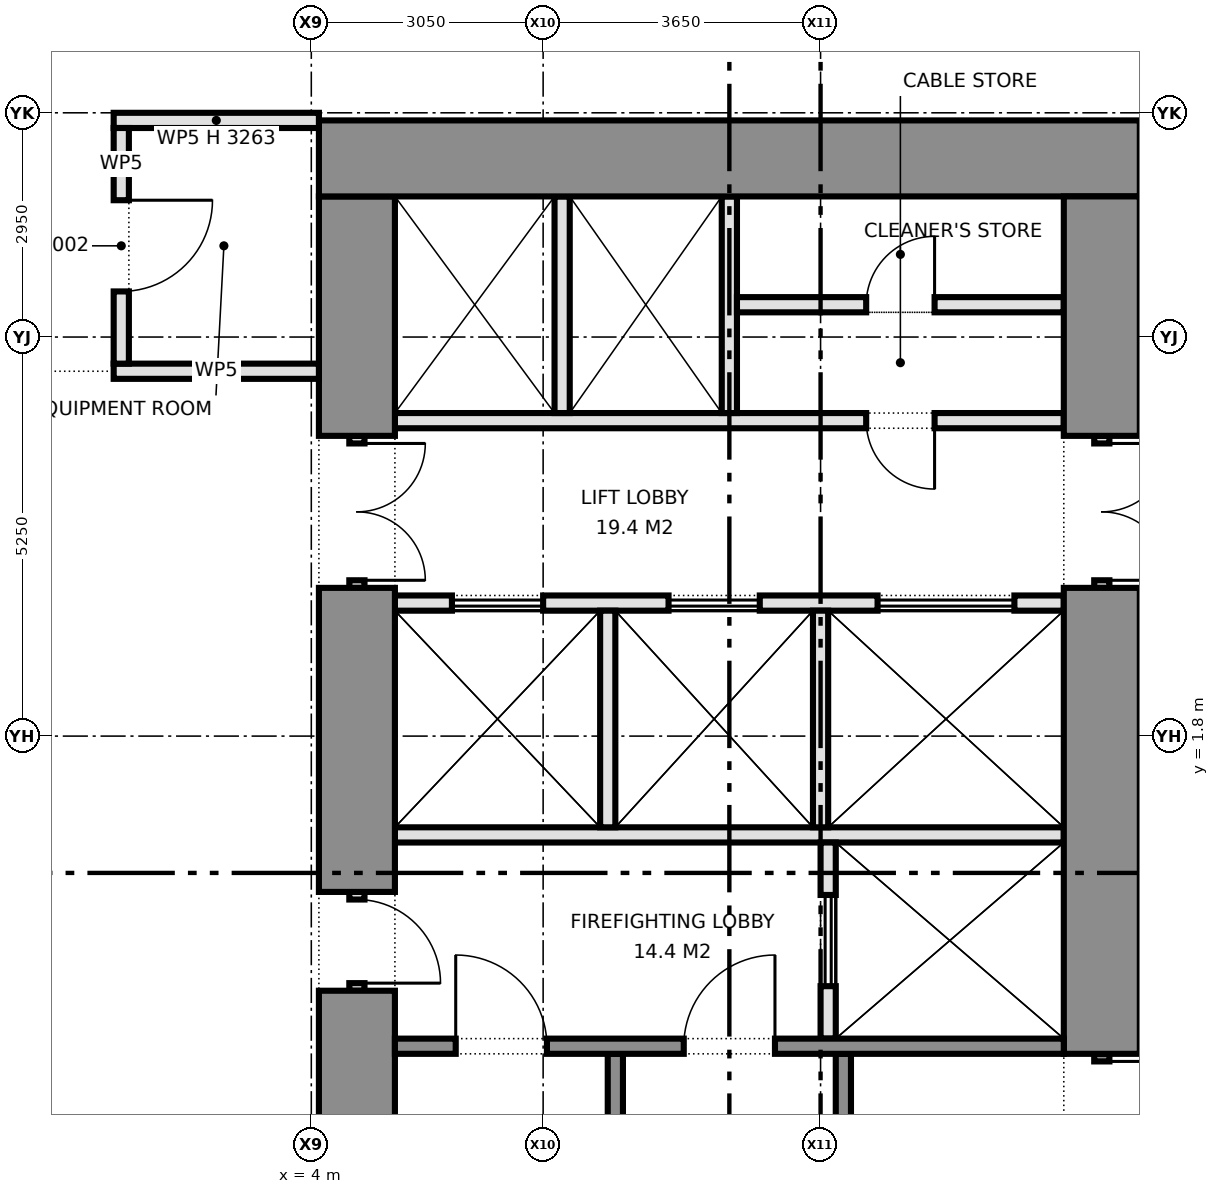
"""IFC4 building model, lengths in metres.
Left out: names, types, materials, properties, quantities, classifications, styles, units other than length and angle.
Written with IfcOpenShell. Run it as: python <this file> out.ifc"""

import sys

from ifc_helpers import new_model, si_unit, direction, frame, frame_2d, origin, place, context, subcontext, project, spatial, rectangle, extrude, element, fill, save


model = new_model("IFC4")
c1 = context("Model", 3, precision=1e-05, world=origin(), true_north=direction((0.0, 1.0)))
c2 = subcontext(c1, "Body", "Model", "MODEL_VIEW")
j1 = project(units=[si_unit("LENGTHUNIT", "METRE"), si_unit("PLANEANGLEUNIT", "RADIAN")], contexts=[c1])
p1 = place(None, origin())
s1 = spatial("IfcSite", under=j1, at=p1, CompositionType="ELEMENT")
p2 = place(p1, origin())
s2 = spatial("IfcBuilding", under=s1, at=p2, CompositionType="ELEMENT")
p3 = place(p2, frame((0.0, 0.0, 99.6)))
s3 = spatial("IfcBuildingStorey", under=s2, at=p3, CompositionType="ELEMENT", Elevation=99.6)
p4 = place(p3, frame((14.9, 9.4, 0.0), z_axis=(0.0, 0.0, 1.0), x_axis=(-1.0, 0.0, 0.0)))
e1 = element("IfcWall", 1, at=p4, inside=s3, PredefinedType="SHEAR", context=c2, shape_type="SweptSolid", body=[
    extrude(rectangle(XDim=10.8, YDim=1.0, at=frame_2d((5.4, 0.0))), origin(), (0.0, 0.0, 1.0), 4.2),
])
p5 = place(p3, frame((14.4, 8.9, 0.0), z_axis=(0.0, 0.0, 1.0), x_axis=(0.0, -1.0, 0.0)))
e2 = element("IfcWall", 2, at=p5, inside=s3, PredefinedType="SHEAR", context=c2, shape_type="SweptSolid", body=[
    extrude(rectangle(XDim=3.15, YDim=1.0, at=frame_2d((1.575, 0.0))), origin(), (0.0, 0.0, 1.0), 4.2),
])
p6 = place(p3, frame((14.4, 5.75, 0.0), z_axis=(0.0, 0.0, 1.0), x_axis=(0.0, -1.0, 0.0)))
e3 = element("IfcWall", 3, at=p6, inside=s3, PredefinedType="PARTITIONING", context=c2, shape_type="SweptSolid", body=[
    extrude(rectangle(XDim=2.0, YDim=0.2, at=frame_2d((1.0, 0.0))), origin(), (0.0, 0.0, 1.0), 2.4),
])
p7 = place(p6, frame((0.1, 0.0, 0.0)))
e4 = element("IfcOpeningElement", 4, at=p7, cuts=e3, PredefinedType="OPENING", context=c2, shape_type="SweptSolid", body=[
    extrude(rectangle(XDim=1.8, YDim=2.1, at=frame_2d((0.9, 1.05))), frame((0.0, 0.11, 0.0), z_axis=(0.0, -1.0, 0.0), x_axis=(1.0, 0.0, 0.0)), (0.0, 0.0, 1.0), 0.22),
])
p8 = place(p3, frame((14.4, 3.75, 0.0), z_axis=(0.0, 0.0, 1.0), x_axis=(0.0, -1.0, 0.0)))
e5 = element("IfcWall", 5, at=p8, inside=s3, PredefinedType="SHEAR", context=c2, shape_type="SweptSolid", body=[
    extrude(rectangle(XDim=6.13, YDim=1.0, at=frame_2d((3.065, 0.0))), origin(), (0.0, 0.0, 1.0), 4.2),
])
p9 = place(p3, frame((14.4, -2.38, 0.0), z_axis=(0.0, 0.0, 1.0), x_axis=(0.0, -1.0, 0.0)))
e6 = element("IfcWall", 6, at=p9, inside=s3, PredefinedType="SHEAR", context=c2, shape_type="SweptSolid", body=[
    extrude(rectangle(XDim=1.3, YDim=0.2, at=frame_2d((0.65, 0.0))), origin(), (0.0, 0.0, 1.0), 2.4),
])
p10 = place(p9, frame((0.1, 0.0, 0.0)))
e7 = element("IfcOpeningElement", 7, at=p10, cuts=e6, PredefinedType="OPENING", context=c2, shape_type="SweptSolid", body=[
    extrude(rectangle(XDim=1.1, YDim=2.1, at=frame_2d((0.55, 1.05))), frame((0.0, 0.11, 0.0), z_axis=(0.0, -1.0, 0.0), x_axis=(1.0, 0.0, 0.0)), (0.0, 0.0, 1.0), 0.22),
])
p11 = place(p3, frame((4.6, 8.9, 0.0), z_axis=(0.0, 0.0, 1.0), x_axis=(0.0, -1.0, 0.0)))
e8 = element("IfcWall", 8, at=p11, inside=s3, PredefinedType="SHEAR", context=c2, shape_type="SweptSolid", body=[
    extrude(rectangle(XDim=3.15, YDim=1.0, at=frame_2d((1.575, 0.0))), origin(), (0.0, 0.0, 1.0), 4.2),
])
p12 = place(p3, frame((4.6, 5.75, 0.0), z_axis=(0.0, 0.0, 1.0), x_axis=(0.0, -1.0, 0.0)))
e9 = element("IfcWall", 9, at=p12, inside=s3, PredefinedType="PARTITIONING", context=c2, shape_type="SweptSolid", body=[
    extrude(rectangle(XDim=2.0, YDim=0.2, at=frame_2d((1.0, 0.0))), origin(), (0.0, 0.0, 1.0), 2.4),
])
p13 = place(p12, frame((0.1, 0.0, 0.0)))
e10 = element("IfcOpeningElement", 10, at=p13, cuts=e9, PredefinedType="OPENING", context=c2, shape_type="SweptSolid", body=[
    extrude(rectangle(XDim=1.8, YDim=2.1, at=frame_2d((0.9, 1.05))), frame((0.0, 0.11, 0.0), z_axis=(0.0, -1.0, 0.0), x_axis=(1.0, 0.0, 0.0)), (0.0, 0.0, 1.0), 0.22),
])
p14 = place(p3, frame((4.6, 3.75, 0.0), z_axis=(0.0, 0.0, 1.0), x_axis=(0.0, -1.0, 0.0)))
e11 = element("IfcWall", 11, at=p14, inside=s3, PredefinedType="SHEAR", context=c2, shape_type="SweptSolid", body=[
    extrude(rectangle(XDim=4.0, YDim=1.0, at=frame_2d((2.0, 0.0))), origin(), (0.0, 0.0, 1.0), 4.2),
])
p15 = place(p3, frame((4.6, -0.25, 0.0), z_axis=(0.0, 0.0, 1.0), x_axis=(0.0, -1.0, 0.0)))
e12 = element("IfcWall", 12, at=p15, inside=s3, PredefinedType="PARTITIONING", context=c2, shape_type="SweptSolid", body=[
    extrude(rectangle(XDim=1.3, YDim=0.2, at=frame_2d((0.65, 0.0))), origin(), (0.0, 0.0, 1.0), 2.4),
])
p16 = place(p15, frame((0.1, 0.0, 0.0)))
e13 = element("IfcOpeningElement", 13, at=p16, cuts=e12, PredefinedType="OPENING", context=c2, shape_type="SweptSolid", body=[
    extrude(rectangle(XDim=1.1, YDim=2.1, at=frame_2d((0.55, 1.05))), frame((0.0, 0.11, 0.0), z_axis=(0.0, -1.0, 0.0), x_axis=(1.0, 0.0, 0.0)), (0.0, 0.0, 1.0), 0.22),
])
p17 = place(p3, frame((4.6, -1.55, 0.0), z_axis=(0.0, 0.0, 1.0), x_axis=(0.0, -1.0, 0.0)))
e14 = element("IfcWall", 14, at=p17, inside=s3, PredefinedType="SHEAR", context=c2, shape_type="SweptSolid", body=[
    extrude(rectangle(XDim=7.35, YDim=1.0, at=frame_2d((3.675, 0.0))), origin(), (0.0, 0.0, 1.0), 4.2),
])
p18 = place(p3, frame((13.9, 5.95, 0.0), z_axis=(0.0, 0.0, 1.0), x_axis=(-1.0, 0.0, 0.0)))
e15 = element("IfcWall", 15, at=p18, inside=s3, PredefinedType="PARTITIONING", context=c2, shape_type="SweptSolid", body=[
    extrude(rectangle(XDim=8.8, YDim=0.2, at=frame_2d((4.4, 0.0))), origin(), (0.0, 0.0, 1.0), 4.2),
])
p19 = place(p18, frame((1.7, 0.0, 0.0)))
e16 = element("IfcOpeningElement", 16, at=p19, cuts=e15, PredefinedType="OPENING", context=c2, shape_type="SweptSolid", body=[
    extrude(rectangle(XDim=0.9, YDim=2.1, at=frame_2d((0.45, 1.05))), frame((0.0, 0.11, 0.0), z_axis=(0.0, -1.0, 0.0), x_axis=(1.0, 0.0, 0.0)), (0.0, 0.0, 1.0), 0.22),
])
p20 = place(p3, frame((13.9, 3.55, 0.0), z_axis=(0.0, 0.0, 1.0), x_axis=(-1.0, 0.0, 0.0)))
e17 = element("IfcWall", 17, at=p20, inside=s3, PredefinedType="PARTITIONING", context=c2, shape_type="SweptSolid", body=[
    extrude(rectangle(XDim=8.8, YDim=0.2, at=frame_2d((4.4, 0.0))), origin(), (0.0, 0.0, 1.0), 4.2),
])
p21 = place(p20, frame((0.65, 0.0, 0.0)))
e18 = element("IfcOpeningElement", 18, at=p21, cuts=e17, PredefinedType="OPENING", context=c2, shape_type="SweptSolid", body=[
    extrude(rectangle(XDim=1.8, YDim=2.1, at=frame_2d((0.9, 1.05))), frame((0.0, 0.11, 0.0), z_axis=(0.0, -1.0, 0.0), x_axis=(1.0, 0.0, 0.0)), (0.0, 0.0, 1.0), 0.22),
])
p22 = place(p20, frame((4.0, 0.0, 0.0)))
e19 = element("IfcOpeningElement", 19, at=p22, cuts=e17, PredefinedType="OPENING", context=c2, shape_type="SweptSolid", body=[
    extrude(rectangle(XDim=1.2, YDim=2.1, at=frame_2d((0.6, 1.05))), frame((0.0, 0.11, 0.0), z_axis=(0.0, -1.0, 0.0), x_axis=(1.0, 0.0, 0.0)), (0.0, 0.0, 1.0), 0.22),
])
p23 = place(p20, frame((6.85, 0.0, 0.0)))
e20 = element("IfcOpeningElement", 20, at=p23, cuts=e17, PredefinedType="OPENING", context=c2, shape_type="SweptSolid", body=[
    extrude(rectangle(XDim=1.2, YDim=2.1, at=frame_2d((0.6, 1.05))), frame((0.0, 0.11, 0.0), z_axis=(0.0, -1.0, 0.0), x_axis=(1.0, 0.0, 0.0)), (0.0, 0.0, 1.0), 0.22),
])
p24 = place(p3, frame((13.9, 0.5, 0.0), z_axis=(0.0, 0.0, 1.0), x_axis=(-1.0, 0.0, 0.0)))
e21 = element("IfcWall", 21, at=p24, inside=s3, PredefinedType="PARTITIONING", context=c2, shape_type="SweptSolid", body=[
    extrude(rectangle(XDim=8.8, YDim=0.2, at=frame_2d((4.4, 0.0))), origin(), (0.0, 0.0, 1.0), 4.2),
])
p25 = place(p3, frame((10.8, 0.4, 0.0), z_axis=(0.0, 0.0, 1.0), x_axis=(0.0, -1.0, 0.0)))
e22 = element("IfcWall", 22, at=p25, inside=s3, PredefinedType="PARTITIONING", context=c2, shape_type="SweptSolid", body=[
    extrude(rectangle(XDim=2.58, YDim=0.2, at=frame_2d((1.29, 0.0))), origin(), (0.0, 0.0, 1.0), 4.2),
])
p26 = place(p25, frame((0.69, 0.0, 0.0)))
e23 = element("IfcOpeningElement", 23, at=p26, cuts=e22, PredefinedType="OPENING", context=c2, shape_type="SweptSolid", body=[
    extrude(rectangle(XDim=1.2, YDim=2.1, at=frame_2d((0.6, 1.05))), frame((0.0, 0.11, 0.0), z_axis=(0.0, -1.0, 0.0), x_axis=(1.0, 0.0, 0.0)), (0.0, 0.0, 1.0), 0.22),
])
p27 = place(p3, frame((13.9, -2.28, 0.0), z_axis=(0.0, 0.0, 1.0), x_axis=(-1.0, 0.0, 0.0)))
e24 = element("IfcWall", 24, at=p27, inside=s3, PredefinedType="SHEAR", context=c2, shape_type="SweptSolid", body=[
    extrude(rectangle(XDim=8.8, YDim=0.2, at=frame_2d((4.4, 0.0))), origin(), (0.0, 0.0, 1.0), 4.2),
])
p28 = place(p27, frame((3.8, 0.0, 0.0)))
e25 = element("IfcOpeningElement", 25, at=p28, cuts=e24, PredefinedType="OPENING", context=c2, shape_type="SweptSolid", body=[
    extrude(rectangle(XDim=1.2, YDim=2.1, at=frame_2d((0.6, 1.05))), frame((0.0, 0.11, 0.0), z_axis=(0.0, -1.0, 0.0), x_axis=(1.0, 0.0, 0.0)), (0.0, 0.0, 1.0), 0.22),
])
p29 = place(p27, frame((6.8, 0.0, 0.0)))
e26 = element("IfcOpeningElement", 26, at=p29, cuts=e24, PredefinedType="OPENING", context=c2, shape_type="SweptSolid", body=[
    extrude(rectangle(XDim=1.2, YDim=2.1, at=frame_2d((0.6, 1.05))), frame((0.0, 0.11, 0.0), z_axis=(0.0, -1.0, 0.0), x_axis=(1.0, 0.0, 0.0)), (0.0, 0.0, 1.0), 0.22),
])
for number, where, z_axis, x_axis in (
    (27, (11.0, -2.38, 0.0), (0.0, 0.0, 1.0), (0.0, -1.0, 0.0)),
    (28, (8.0, -2.38, 0.0), (0.0, 0.0, 1.0), (0.0, -1.0, 0.0)),
):
    element("IfcWall", number, at=place(p3, frame(where, z_axis=z_axis, x_axis=x_axis)), inside=s3, PredefinedType="SHEAR", context=c2, shape_type="SweptSolid", body=[
        extrude(rectangle(XDim=6.52, YDim=0.2, at=frame_2d((3.26, 0.0))), origin(), (0.0, 0.0, 1.0), 4.2),
    ])
for number, where, z_axis, x_axis in (
    (29, (9.5, 8.9, 0.0), (0.0, 0.0, 1.0), (0.0, -1.0, 0.0)),
    (30, (7.3, 8.9, 0.0), (0.0, 0.0, 1.0), (0.0, -1.0, 0.0)),
):
    element("IfcWall", number, at=place(p3, frame(where, z_axis=z_axis, x_axis=x_axis)), inside=s3, PredefinedType="PARTITIONING", context=c2, shape_type="SweptSolid", body=[
        extrude(rectangle(XDim=2.85, YDim=0.2, at=frame_2d((1.425, 0.0))), origin(), (0.0, 0.0, 1.0), 4.2),
    ])
p30 = place(p3, frame((13.9, 7.475, 0.0), z_axis=(0.0, 0.0, 1.0), x_axis=(-1.0, 0.0, 0.0)))
e31 = element("IfcWall", 31, at=p30, inside=s3, PredefinedType="PARTITIONING", context=c2, shape_type="SweptSolid", body=[
    extrude(rectangle(XDim=4.3, YDim=0.2, at=frame_2d((2.15, 0.0))), origin(), (0.0, 0.0, 1.0), 4.2),
])
p31 = place(p30, frame((1.7, 0.0, 0.0)))
e32 = element("IfcOpeningElement", 32, at=p31, cuts=e31, PredefinedType="OPENING", context=c2, shape_type="SweptSolid", body=[
    extrude(rectangle(XDim=0.9, YDim=2.1, at=frame_2d((0.45, 1.05))), frame((0.0, 0.11, 0.0), z_axis=(0.0, -1.0, 0.0), x_axis=(1.0, 0.0, 0.0)), (0.0, 0.0, 1.0), 0.22),
])
for number, where, z_axis, x_axis in (
    (33, (10.7, 3.45, 0.0), (0.0, 0.0, 1.0), (0.0, -1.0, 0.0)),
    (34, (7.9, 3.45, 0.0), (0.0, 0.0, 1.0), (0.0, -1.0, 0.0)),
):
    element("IfcWall", number, at=place(p3, frame(where, z_axis=z_axis, x_axis=x_axis)), inside=s3, PredefinedType="PARTITIONING", context=c2, shape_type="SweptSolid", body=[
        extrude(rectangle(XDim=2.85, YDim=0.2, at=frame_2d((1.425, 0.0))), origin(), (0.0, 0.0, 1.0), 4.2),
    ])
p32 = place(p3, frame((1.4, 6.6, 0.0), z_axis=(0.0, 0.0, 1.0), x_axis=(1.0, 0.0, 0.0)))
e35 = element("IfcWall", 35, at=p32, inside=s3, PredefinedType="PARTITIONING", context=c2, shape_type="SweptSolid", body=[
    extrude(rectangle(XDim=2.7, YDim=0.2, at=frame_2d((1.35, 0.0))), origin(), (0.0, 0.0, 1.0), 4.2),
])
p33 = place(p3, frame((1.4, 9.9, 0.0), z_axis=(0.0, 0.0, 1.0), x_axis=(1.0, 0.0, 0.0)))
e36 = element("IfcWall", 36, at=p33, inside=s3, PredefinedType="PARTITIONING", context=c2, shape_type="SweptSolid", body=[
    extrude(rectangle(XDim=2.7, YDim=0.2, at=frame_2d((1.35, 0.0))), origin(), (0.0, 0.0, 1.0), 3.263),
])
p34 = place(p3, frame((1.5, 6.7, 0.0), z_axis=(0.0, 0.0, 1.0), x_axis=(0.0, 1.0, 0.0)))
e37 = element("IfcWall", 37, at=p34, inside=s3, PredefinedType="PARTITIONING", context=c2, shape_type="SweptSolid", body=[
    extrude(rectangle(XDim=3.1, YDim=0.2, at=frame_2d((1.55, 0.0))), origin(), (0.0, 0.0, 1.0), 4.2),
])
p35 = place(p34, frame((0.95, 0.0, 0.0)))
e38 = element("IfcOpeningElement", 38, at=p35, cuts=e37, PredefinedType="OPENING", context=c2, shape_type="SweptSolid", body=[
    extrude(rectangle(XDim=1.2, YDim=2.1, at=frame_2d((0.6, 1.05))), frame((0.0, 0.11, 0.0), z_axis=(0.0, -1.0, 0.0), x_axis=(1.0, 0.0, 0.0)), (0.0, 0.0, 1.0), 0.22),
])
p36 = place(p7, origin())
e39 = element("IfcDoor", 39, at=p36, inside=s3, OperationType="DOUBLE_DOOR_SINGLE_SWING", PredefinedType="DOOR", context=c2, shape_type="SweptSolid", body=[
    extrude(rectangle(XDim=1.8, YDim=2.1, at=frame_2d((0.9, 1.05))), frame((0.0, 0.025, 0.0), z_axis=(0.0, -1.0, 0.0), x_axis=(1.0, 0.0, 0.0)), (0.0, 0.0, 1.0), 0.05),
])
fill(e4, e39)
p37 = place(p10, origin())
e40 = element("IfcDoor", 40, at=p37, inside=s3, OperationType="SINGLE_SWING_LEFT", PredefinedType="DOOR", context=c2, shape_type="SweptSolid", body=[
    extrude(rectangle(XDim=1.1, YDim=2.1, at=frame_2d((0.55, 1.05))), frame((0.0, 0.025, 0.0), z_axis=(0.0, -1.0, 0.0), x_axis=(1.0, 0.0, 0.0)), (0.0, 0.0, 1.0), 0.05),
])
fill(e7, e40)
p38 = place(p13, origin())
e41 = element("IfcDoor", 41, at=p38, inside=s3, OperationType="DOUBLE_DOOR_SINGLE_SWING", PredefinedType="DOOR", context=c2, shape_type="SweptSolid", body=[
    extrude(rectangle(XDim=1.8, YDim=2.1, at=frame_2d((0.9, 1.05))), frame((0.0, 0.025, 0.0), z_axis=(0.0, -1.0, 0.0), x_axis=(1.0, 0.0, 0.0)), (0.0, 0.0, 1.0), 0.05),
])
fill(e10, e41)
p39 = place(p16, origin())
e42 = element("IfcDoor", 42, at=p39, inside=s3, OperationType="SINGLE_SWING_RIGHT", PredefinedType="DOOR", context=c2, shape_type="SweptSolid", body=[
    extrude(rectangle(XDim=1.1, YDim=2.1, at=frame_2d((0.55, 1.05))), frame((0.0, 0.025, 0.0), z_axis=(0.0, -1.0, 0.0), x_axis=(1.0, 0.0, 0.0)), (0.0, 0.0, 1.0), 0.05),
])
fill(e13, e42)
p40 = place(p21, origin())
e43 = element("IfcDoor", 43, at=p40, inside=s3, OperationType="DOUBLE_DOOR_SLIDING", PredefinedType="DOOR", context=c2, shape_type="SweptSolid", body=[
    extrude(rectangle(XDim=1.8, YDim=2.1, at=frame_2d((0.9, 1.05))), frame((0.0, 0.025, 0.0), z_axis=(0.0, -1.0, 0.0), x_axis=(1.0, 0.0, 0.0)), (0.0, 0.0, 1.0), 0.05),
])
fill(e18, e43)
p41 = place(p22, origin())
e44 = element("IfcDoor", 44, at=p41, inside=s3, OperationType="DOUBLE_DOOR_SLIDING", PredefinedType="DOOR", context=c2, shape_type="SweptSolid", body=[
    extrude(rectangle(XDim=1.2, YDim=2.1, at=frame_2d((0.6, 1.05))), frame((0.0, 0.025, 0.0), z_axis=(0.0, -1.0, 0.0), x_axis=(1.0, 0.0, 0.0)), (0.0, 0.0, 1.0), 0.05),
])
fill(e19, e44)
p42 = place(p23, origin())
e45 = element("IfcDoor", 45, at=p42, inside=s3, OperationType="DOUBLE_DOOR_SLIDING", PredefinedType="DOOR", context=c2, shape_type="SweptSolid", body=[
    extrude(rectangle(XDim=1.2, YDim=2.1, at=frame_2d((0.6, 1.05))), frame((0.0, 0.025, 0.0), z_axis=(0.0, -1.0, 0.0), x_axis=(1.0, 0.0, 0.0)), (0.0, 0.0, 1.0), 0.05),
])
fill(e20, e45)
p43 = place(p26, origin())
e46 = element("IfcDoor", 46, at=p43, inside=s3, OperationType="DOUBLE_DOOR_SLIDING", PredefinedType="DOOR", context=c2, shape_type="SweptSolid", body=[
    extrude(rectangle(XDim=1.2, YDim=2.1, at=frame_2d((0.6, 1.05))), frame((0.0, 0.025, 0.0), z_axis=(0.0, -1.0, 0.0), x_axis=(1.0, 0.0, 0.0)), (0.0, 0.0, 1.0), 0.05),
])
fill(e23, e46)
p44 = place(p19, origin())
e47 = element("IfcDoor", 47, at=p44, inside=s3, OperationType="SINGLE_SWING_LEFT", PredefinedType="DOOR", context=c2, shape_type="SweptSolid", body=[
    extrude(rectangle(XDim=0.9, YDim=2.1, at=frame_2d((0.45, 1.05))), frame((0.0, 0.025, 0.0), z_axis=(0.0, -1.0, 0.0), x_axis=(1.0, 0.0, 0.0)), (0.0, 0.0, 1.0), 0.05),
])
fill(e16, e47)
p45 = place(p31, frame((0.9, 0.0, 0.0), z_axis=(0.0, 0.0, 1.0), x_axis=(-1.0, 0.0, 0.0)))
e48 = element("IfcDoor", 48, at=p45, inside=s3, OperationType="SINGLE_SWING_RIGHT", PredefinedType="DOOR", context=c2, shape_type="SweptSolid", body=[
    extrude(rectangle(XDim=0.9, YDim=2.1, at=frame_2d((0.45, 1.05))), frame((0.0, 0.025, 0.0), z_axis=(0.0, -1.0, 0.0), x_axis=(1.0, 0.0, 0.0)), (0.0, 0.0, 1.0), 0.05),
])
fill(e32, e48)
p46 = place(p28, frame((1.2, 0.0, 0.0), z_axis=(0.0, 0.0, 1.0), x_axis=(-1.0, 0.0, 0.0)))
e49 = element("IfcDoor", 49, at=p46, inside=s3, OperationType="SINGLE_SWING_RIGHT", PredefinedType="DOOR", context=c2, shape_type="SweptSolid", body=[
    extrude(rectangle(XDim=1.2, YDim=2.1, at=frame_2d((0.6, 1.05))), frame((0.0, 0.025, 0.0), z_axis=(0.0, -1.0, 0.0), x_axis=(1.0, 0.0, 0.0)), (0.0, 0.0, 1.0), 0.05),
])
fill(e25, e49)
p47 = place(p29, frame((1.2, 0.0, 0.0), z_axis=(0.0, 0.0, 1.0), x_axis=(-1.0, 0.0, 0.0)))
e50 = element("IfcDoor", 50, at=p47, inside=s3, OperationType="SINGLE_SWING_LEFT", PredefinedType="DOOR", context=c2, shape_type="SweptSolid", body=[
    extrude(rectangle(XDim=1.2, YDim=2.1, at=frame_2d((0.6, 1.05))), frame((0.0, 0.025, 0.0), z_axis=(0.0, -1.0, 0.0), x_axis=(1.0, 0.0, 0.0)), (0.0, 0.0, 1.0), 0.05),
])
fill(e26, e50)
p48 = place(p35, frame((1.2, 0.0, 0.0), z_axis=(0.0, 0.0, 1.0), x_axis=(-1.0, 0.0, 0.0)))
e51 = element("IfcDoor", 51, at=p48, inside=s3, OperationType="SINGLE_SWING_LEFT", PredefinedType="DOOR", context=c2, shape_type="SweptSolid", body=[
    extrude(rectangle(XDim=1.2, YDim=2.1, at=frame_2d((0.6, 1.05))), frame((0.0, 0.025, 0.0), z_axis=(0.0, -1.0, 0.0), x_axis=(1.0, 0.0, 0.0)), (0.0, 0.0, 1.0), 0.05),
])
fill(e38, e51)
save(model, sys.argv[1])
